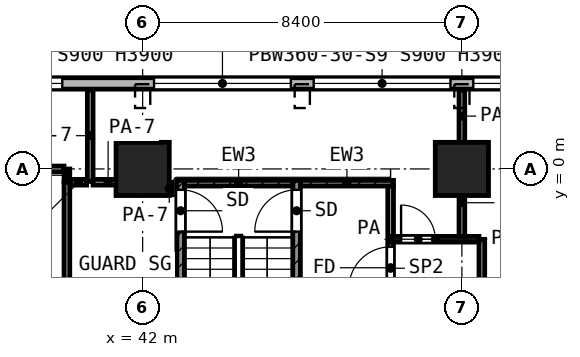
"""IFC4 building model, lengths in metres.
Left out: names, types, materials, properties, quantities, classifications, styles, units other than length and angle.
Written with IfcOpenShell. Run it as: python <this file> out.ifc"""

import sys

from ifc_helpers import new_model, si_unit, direction, frame, frame_2d, origin, origin_2d, place, context, subcontext, project, spatial, rectangle, extrude, element, fill, save


model = new_model("IFC4")
c1 = context("Model", 3, precision=1e-05, world=origin(), true_north=direction((0.0, 1.0)))
c2 = subcontext(c1, "Body", "Model", "MODEL_VIEW")
j1 = project(units=[si_unit("LENGTHUNIT", "METRE"), si_unit("PLANEANGLEUNIT", "RADIAN")], contexts=[c1])
p1 = place(None, origin())
s1 = spatial("IfcSite", under=j1, at=p1, CompositionType="ELEMENT")
p2 = place(p1, origin())
s2 = spatial("IfcBuilding", under=s1, at=p2, CompositionType="ELEMENT")
p3 = place(p2, frame((0.0, 0.0, 18.2)))
s3 = spatial("IfcBuildingStorey", under=s2, at=p3, CompositionType="ELEMENT", Elevation=18.2)
for number, where, z_axis, x_axis in (
    (1, (42.0, 0.0, 0.0), (0.0, 0.0, 1.0), (1.0, 0.0, 0.0)),
    (2, (50.4, 0.0, 0.0), (0.0, 0.0, 1.0), (1.0, 0.0, 0.0)),
):
    element("IfcColumn", number, at=place(p3, frame(where, z_axis=z_axis, x_axis=x_axis)), inside=s3, PredefinedType="COLUMN", context=c2, shape_type="SweptSolid", body=[
        extrude(rectangle(XDim=1.4, YDim=1.4, at=origin_2d()), origin(), (0.0, 0.0, 1.0), 5.6),
    ])
p4 = place(p3, frame((59.85, 2.25, 0.0), z_axis=(0.0, 0.0, 1.0), x_axis=(-1.0, 0.0, 0.0)))
e3 = element("IfcWall", 3, at=p4, inside=s3, PredefinedType="SOLIDWALL", context=c2, shape_type="SweptSolid", body=[
    extrude(rectangle(XDim=56.188, YDim=0.3, at=frame_2d((28.094, 0.0))), origin(), (0.0, 0.0, 1.0), 5.05),
])
p5 = place(p4, frame((2.465, 0.0, 0.9)))
e4 = element("IfcOpeningElement", 4, at=p5, cuts=e3, PredefinedType="OPENING", context=c2, shape_type="SweptSolid", body=[
    extrude(rectangle(XDim=2.4, YDim=3.0, at=frame_2d((1.2, 1.5))), frame((0.0, 0.16, 0.0), z_axis=(0.0, -1.0, 0.0), x_axis=(1.0, 0.0, 0.0)), (0.0, 0.0, 1.0), 0.32),
])
p6 = place(p4, frame((5.55, 0.0, 0.9)))
e5 = element("IfcOpeningElement", 5, at=p6, cuts=e3, PredefinedType="OPENING", context=c2, shape_type="SweptSolid", body=[
    extrude(rectangle(XDim=3.6, YDim=3.0, at=frame_2d((1.8, 1.5))), frame((0.0, 0.16, 0.0), z_axis=(0.0, -1.0, 0.0), x_axis=(1.0, 0.0, 0.0)), (0.0, 0.0, 1.0), 0.32),
])
p7 = place(p4, frame((9.75, 0.0, 0.9)))
e6 = element("IfcOpeningElement", 6, at=p7, cuts=e3, PredefinedType="OPENING", context=c2, shape_type="SweptSolid", body=[
    extrude(rectangle(XDim=3.6, YDim=3.0, at=frame_2d((1.8, 1.5))), frame((0.0, 0.16, 0.0), z_axis=(0.0, -1.0, 0.0), x_axis=(1.0, 0.0, 0.0)), (0.0, 0.0, 1.0), 0.32),
])
p8 = place(p4, frame((13.95, 0.0, 0.9)))
e7 = element("IfcOpeningElement", 7, at=p8, cuts=e3, PredefinedType="OPENING", context=c2, shape_type="SweptSolid", body=[
    extrude(rectangle(XDim=3.6, YDim=3.0, at=frame_2d((1.8, 1.5))), frame((0.0, 0.16, 0.0), z_axis=(0.0, -1.0, 0.0), x_axis=(1.0, 0.0, 0.0)), (0.0, 0.0, 1.0), 0.32),
])
p9 = place(p4, frame((19.965, 0.0, 0.9)))
e8 = element("IfcOpeningElement", 8, at=p9, cuts=e3, PredefinedType="OPENING", context=c2, shape_type="SweptSolid", body=[
    extrude(rectangle(XDim=1.2, YDim=3.0, at=frame_2d((0.6, 1.5))), frame((0.0, 0.16, 0.0), z_axis=(0.0, -1.0, 0.0), x_axis=(1.0, 0.0, 0.0)), (0.0, 0.0, 1.0), 0.32),
])
p10 = place(p4, frame((22.35, 0.0, 0.9)))
e9 = element("IfcOpeningElement", 9, at=p10, cuts=e3, PredefinedType="OPENING", context=c2, shape_type="SweptSolid", body=[
    extrude(rectangle(XDim=3.6, YDim=3.0, at=frame_2d((1.8, 1.5))), frame((0.0, 0.16, 0.0), z_axis=(0.0, -1.0, 0.0), x_axis=(1.0, 0.0, 0.0)), (0.0, 0.0, 1.0), 0.32),
])
p11 = place(p4, frame((26.55, 0.0, 0.9)))
e10 = element("IfcOpeningElement", 10, at=p11, cuts=e3, PredefinedType="OPENING", context=c2, shape_type="SweptSolid", body=[
    extrude(rectangle(XDim=3.6, YDim=3.0, at=frame_2d((1.8, 1.5))), frame((0.0, 0.16, 0.0), z_axis=(0.0, -1.0, 0.0), x_axis=(1.0, 0.0, 0.0)), (0.0, 0.0, 1.0), 0.32),
])
p12 = place(p4, frame((30.75, 0.0, 0.9)))
e11 = element("IfcOpeningElement", 11, at=p12, cuts=e3, PredefinedType="OPENING", context=c2, shape_type="SweptSolid", body=[
    extrude(rectangle(XDim=3.6, YDim=3.0, at=frame_2d((1.8, 1.5))), frame((0.0, 0.16, 0.0), z_axis=(0.0, -1.0, 0.0), x_axis=(1.0, 0.0, 0.0)), (0.0, 0.0, 1.0), 0.32),
])
p13 = place(p4, frame((34.95, 0.0, 0.9)))
e12 = element("IfcOpeningElement", 12, at=p13, cuts=e3, PredefinedType="OPENING", context=c2, shape_type="SweptSolid", body=[
    extrude(rectangle(XDim=3.6, YDim=3.0, at=frame_2d((1.8, 1.5))), frame((0.0, 0.16, 0.0), z_axis=(0.0, -1.0, 0.0), x_axis=(1.0, 0.0, 0.0)), (0.0, 0.0, 1.0), 0.32),
])
p14 = place(p4, frame((39.15, 0.0, 0.9)))
e13 = element("IfcOpeningElement", 13, at=p14, cuts=e3, PredefinedType="OPENING", context=c2, shape_type="SweptSolid", body=[
    extrude(rectangle(XDim=3.6, YDim=3.0, at=frame_2d((1.8, 1.5))), frame((0.0, 0.16, 0.0), z_axis=(0.0, -1.0, 0.0), x_axis=(1.0, 0.0, 0.0)), (0.0, 0.0, 1.0), 0.32),
])
p15 = place(p4, frame((43.35, 0.0, 0.9)))
e14 = element("IfcOpeningElement", 14, at=p15, cuts=e3, PredefinedType="OPENING", context=c2, shape_type="SweptSolid", body=[
    extrude(rectangle(XDim=3.6, YDim=3.0, at=frame_2d((1.8, 1.5))), frame((0.0, 0.16, 0.0), z_axis=(0.0, -1.0, 0.0), x_axis=(1.0, 0.0, 0.0)), (0.0, 0.0, 1.0), 0.32),
])
p16 = place(p4, frame((47.55, 0.0, 0.9)))
e15 = element("IfcOpeningElement", 15, at=p16, cuts=e3, PredefinedType="OPENING", context=c2, shape_type="SweptSolid", body=[
    extrude(rectangle(XDim=3.6, YDim=3.0, at=frame_2d((1.8, 1.5))), frame((0.0, 0.16, 0.0), z_axis=(0.0, -1.0, 0.0), x_axis=(1.0, 0.0, 0.0)), (0.0, 0.0, 1.0), 0.32),
])
p17 = place(p4, frame((51.75, 0.0, 0.9)))
e16 = element("IfcOpeningElement", 16, at=p17, cuts=e3, PredefinedType="OPENING", context=c2, shape_type="SweptSolid", body=[
    extrude(rectangle(XDim=3.6, YDim=3.0, at=frame_2d((1.8, 1.5))), frame((0.0, 0.16, 0.0), z_axis=(0.0, -1.0, 0.0), x_axis=(1.0, 0.0, 0.0)), (0.0, 0.0, 1.0), 0.32),
])
p18 = place(p3, frame((43.0, -8.65, 0.0), z_axis=(0.0, 0.0, 1.0), x_axis=(0.0, 1.0, 0.0)))
e17 = element("IfcWall", 17, at=p18, inside=s3, PredefinedType="SHEAR", context=c2, shape_type="SweptSolid", body=[
    extrude(rectangle(XDim=8.35, YDim=0.2, at=frame_2d((4.175, 0.0))), origin(), (0.0, 0.0, 1.0), 5.05),
])
p19 = place(p18, frame((7.0, 0.0, 0.0)))
e18 = element("IfcOpeningElement", 18, at=p19, cuts=e17, PredefinedType="OPENING", context=c2, shape_type="SweptSolid", body=[
    extrude(rectangle(XDim=1.1, YDim=2.1, at=frame_2d((0.55, 1.05))), frame((0.0, 0.11, 0.0), z_axis=(0.0, -1.0, 0.0), x_axis=(1.0, 0.0, 0.0)), (0.0, 0.0, 1.0), 0.22),
])
p20 = place(p3, frame((46.05, -8.65, 0.0), z_axis=(0.0, 0.0, 1.0), x_axis=(0.0, 1.0, 0.0)))
e19 = element("IfcWall", 19, at=p20, inside=s3, PredefinedType="SHEAR", context=c2, shape_type="SweptSolid", body=[
    extrude(rectangle(XDim=8.35, YDim=0.2, at=frame_2d((4.175, 0.0))), origin(), (0.0, 0.0, 1.0), 5.05),
])
p21 = place(p20, frame((7.0, 0.0, 0.0)))
e20 = element("IfcOpeningElement", 20, at=p21, cuts=e19, PredefinedType="OPENING", context=c2, shape_type="SweptSolid", body=[
    extrude(rectangle(XDim=1.1, YDim=2.1, at=frame_2d((0.55, 1.05))), frame((0.0, 0.11, 0.0), z_axis=(0.0, -1.0, 0.0), x_axis=(1.0, 0.0, 0.0)), (0.0, 0.0, 1.0), 0.22),
])
p22 = place(p3, frame((43.1, -0.375, 0.0), z_axis=(0.0, 0.0, 1.0), x_axis=(1.0, 0.0, 0.0)))
e21 = element("IfcWall", 21, at=p22, inside=s3, PredefinedType="SHEAR", context=c2, shape_type="SweptSolid", body=[
    extrude(rectangle(XDim=2.85, YDim=0.15, at=frame_2d((1.425, 0.0))), origin(), (0.0, 0.0, 1.0), 5.05),
])
p23 = place(p3, frame((46.15, -0.375, 0.0), z_axis=(0.0, 0.0, 1.0), x_axis=(1.0, 0.0, 0.0)))
e22 = element("IfcWall", 22, at=p23, inside=s3, PredefinedType="SHEAR", context=c2, shape_type="SweptSolid", body=[
    extrude(rectangle(XDim=2.45, YDim=0.15, at=frame_2d((1.225, 0.0))), origin(), (0.0, 0.0, 1.0), 5.05),
])
p24 = place(p3, frame((48.525, -4.775, 0.0), z_axis=(0.0, 0.0, 1.0), x_axis=(0.0, 1.0, 0.0)))
e23 = element("IfcWall", 23, at=p24, inside=s3, PredefinedType="PARTITIONING", context=c2, shape_type="SweptSolid", body=[
    extrude(rectangle(XDim=4.325, YDim=0.15, at=frame_2d((2.163, 0.0))), origin(), (0.0, 0.0, 1.0), 5.05),
])
p25 = place(p24, frame((1.625, 0.0, 0.0)))
e24 = element("IfcOpeningElement", 24, at=p25, cuts=e23, PredefinedType="OPENING", context=c2, shape_type="SweptSolid", body=[
    extrude(rectangle(XDim=1.1, YDim=2.1, at=frame_2d((0.55, 1.05))), frame((0.0, 0.085, 0.0), z_axis=(0.0, -1.0, 0.0), x_axis=(1.0, 0.0, 0.0)), (0.0, 0.0, 1.0), 0.17),
])
p26 = place(p3, frame((48.55, -1.85, 0.0), z_axis=(0.0, 0.0, 1.0), x_axis=(1.0, 0.0, 0.0)))
e25 = element("IfcWall", 25, at=p26, inside=s3, PredefinedType="PARTITIONING", context=c2, shape_type="SweptSolid", body=[
    extrude(rectangle(XDim=2.298, YDim=0.15, at=frame_2d((1.149, 0.0))), origin(), (0.0, 0.0, 1.0), 5.05),
])
p27 = place(p26, frame((0.25, 0.0, 0.0)))
e26 = element("IfcOpeningElement", 26, at=p27, cuts=e25, PredefinedType="OPENING", context=c2, shape_type="SweptSolid", body=[
    extrude(rectangle(XDim=0.9, YDim=2.1, at=frame_2d((0.45, 1.05))), frame((0.0, 0.085, 0.0), z_axis=(0.0, -1.0, 0.0), x_axis=(1.0, 0.0, 0.0)), (0.0, 0.0, 1.0), 0.17),
])
p28 = place(p3, frame((40.102, -0.35, 0.0), z_axis=(0.0, 0.0, 1.0), x_axis=(1.0, 0.0, 0.0)))
e27 = element("IfcWall", 27, at=p28, inside=s3, PredefinedType="PARTITIONING", context=c2, shape_type="SweptSolid", body=[
    extrude(rectangle(XDim=0.423, YDim=0.15, at=frame_2d((0.211, 0.0))), origin(), (0.0, 0.0, 1.0), 3.65),
])
p29 = place(p3, frame((40.695, -0.35, 0.0), z_axis=(0.0, 0.0, 1.0), x_axis=(1.0, 0.0, 0.0)))
e28 = element("IfcWall", 28, at=p29, inside=s3, PredefinedType="PARTITIONING", context=c2, shape_type="SweptSolid", body=[
    extrude(rectangle(XDim=0.793, YDim=0.15, at=frame_2d((0.396, 0.0))), origin(), (0.0, 0.0, 1.0), 3.65),
])
p30 = place(p3, frame((38.478, 0.0, 0.0), z_axis=(0.0, 0.0, 1.0), x_axis=(1.0, 0.0, 0.0)))
e29 = element("IfcWall", 29, at=p30, inside=s3, PredefinedType="PARTITIONING", context=c2, shape_type="SweptSolid", body=[
    extrude(rectangle(XDim=1.452, YDim=0.15, at=frame_2d((0.726, 0.0))), origin(), (0.0, 0.0, 1.0), 3.65),
])
p31 = place(p3, frame((40.007, -8.4, 0.0), z_axis=(0.0, 0.0, 1.0), x_axis=(0.0, 1.0, 0.0)))
e30 = element("IfcWall", 30, at=p31, inside=s3, PredefinedType="PARTITIONING", context=c2, shape_type="SweptSolid", body=[
    extrude(rectangle(XDim=8.05, YDim=0.15, at=frame_2d((4.025, 0.0))), origin(), (0.0, 0.0, 1.0), 3.65),
])
p32 = place(p31, frame((3.525, 0.0, 0.0)))
e31 = element("IfcOpeningElement", 31, at=p32, cuts=e30, PredefinedType="OPENING", context=c2, shape_type="SweptSolid", body=[
    extrude(rectangle(XDim=1.0, YDim=2.1, at=frame_2d((0.5, 1.05))), frame((0.0, 0.085, 0.0), z_axis=(0.0, -1.0, 0.0), x_axis=(1.0, 0.0, 0.0)), (0.0, 0.0, 1.0), 0.17),
])
p33 = place(p3, frame((40.007, -0.33, 0.0), z_axis=(0.0, 0.0, 1.0), x_axis=(0.0, 1.0, 0.0)))
e32 = element("IfcWall", 32, at=p33, inside=s3, PredefinedType="PARTITIONING", context=c2, shape_type="SweptSolid", body=[
    extrude(rectangle(XDim=0.328, YDim=0.15, at=frame_2d((0.164, 0.0))), origin(), (0.0, 0.0, 1.0), 3.65),
])
p34 = place(p3, frame((40.62, -0.33, 0.0), z_axis=(0.0, 0.0, 1.0), x_axis=(0.0, 1.0, 0.0)))
e33 = element("IfcWall", 33, at=p34, inside=s3, PredefinedType="PARTITIONING", context=c2, shape_type="SweptSolid", body=[
    extrude(rectangle(XDim=2.41, YDim=0.15, at=frame_2d((1.205, 0.0))), origin(), (0.0, 0.0, 1.0), 3.65),
])
p35 = place(p3, frame((42.7, -0.68, 0.0), z_axis=(0.0, 0.0, 1.0), x_axis=(0.0, 1.0, 0.0)))
e34 = element("IfcWall", 34, at=p35, inside=s3, PredefinedType="PARTITIONING", context=c2, shape_type="SweptSolid", body=[
    extrude(rectangle(XDim=0.327, YDim=0.15, at=frame_2d((0.164, 0.0))), origin(), (0.0, 0.0, 1.0), 3.65),
])
p36 = place(p3, frame((50.4, -1.775, 0.0), z_axis=(0.0, 0.0, 1.0), x_axis=(0.0, 1.0, 0.0)))
e35 = element("IfcWall", 35, at=p36, inside=s3, PredefinedType="PARTITIONING", context=c2, shape_type="SweptSolid", body=[
    extrude(rectangle(XDim=1.772, YDim=0.15, at=frame_2d((0.886, 0.0))), origin(), (0.0, 0.0, 1.0), 5.05),
])
p37 = place(p3, frame((50.4, 0.7, 0.0), z_axis=(0.0, 0.0, 1.0), x_axis=(0.0, 1.0, 0.0)))
e36 = element("IfcWall", 36, at=p37, inside=s3, PredefinedType="PARTITIONING", context=c2, shape_type="SweptSolid", body=[
    extrude(rectangle(XDim=1.38, YDim=0.15, at=frame_2d((0.69, 0.0))), origin(), (0.0, 0.0, 1.0), 4.15),
])
p38 = place(p3, frame((50.925, -8.4, 0.0), z_axis=(0.0, 0.0, 1.0), x_axis=(0.0, 1.0, 0.0)))
e37 = element("IfcWall", 37, at=p38, inside=s3, PredefinedType="PARTITIONING", context=c2, shape_type="SweptSolid", body=[
    extrude(rectangle(XDim=6.548, YDim=0.15, at=frame_2d((3.274, 0.0))), origin(), (0.0, 0.0, 1.0), 5.05),
])
p39 = place(p38, frame((3.765, 0.0, 0.0)))
e38 = element("IfcOpeningElement", 38, at=p39, cuts=e37, PredefinedType="OPENING", context=c2, shape_type="SweptSolid", body=[
    extrude(rectangle(XDim=1.2, YDim=2.1, at=frame_2d((0.6, 1.05))), frame((0.0, 0.085, 0.0), z_axis=(0.0, -1.0, 0.0), x_axis=(1.0, 0.0, 0.0)), (0.0, 0.0, 1.0), 0.17),
])
p40 = place(p38, frame((1.583, 0.0, 0.0)))
e39 = element("IfcOpeningElement", 39, at=p40, cuts=e37, PredefinedType="OPENING", context=c2, shape_type="SweptSolid", body=[
    extrude(rectangle(XDim=1.2, YDim=2.1, at=frame_2d((0.6, 1.05))), frame((0.0, 0.085, 0.0), z_axis=(0.0, -1.0, 0.0), x_axis=(1.0, 0.0, 0.0)), (0.0, 0.0, 1.0), 0.17),
])
p41 = place(p6, origin())
e40 = element("IfcWindow", 40, at=p41, inside=s3, PartitioningType="SINGLE_PANEL", PredefinedType="WINDOW", context=c2, shape_type="SweptSolid", body=[
    extrude(rectangle(XDim=3.6, YDim=3.0, at=frame_2d((1.8, 1.5))), frame((0.0, 0.03, 0.0), z_axis=(0.0, -1.0, 0.0), x_axis=(1.0, 0.0, 0.0)), (0.0, 0.0, 1.0), 0.06),
])
fill(e5, e40)
p42 = place(p7, origin())
e41 = element("IfcWindow", 41, at=p42, inside=s3, PartitioningType="SINGLE_PANEL", PredefinedType="WINDOW", context=c2, shape_type="SweptSolid", body=[
    extrude(rectangle(XDim=3.6, YDim=3.0, at=frame_2d((1.8, 1.5))), frame((0.0, 0.03, 0.0), z_axis=(0.0, -1.0, 0.0), x_axis=(1.0, 0.0, 0.0)), (0.0, 0.0, 1.0), 0.06),
])
fill(e6, e41)
p43 = place(p8, origin())
e42 = element("IfcWindow", 42, at=p43, inside=s3, PartitioningType="SINGLE_PANEL", PredefinedType="WINDOW", context=c2, shape_type="SweptSolid", body=[
    extrude(rectangle(XDim=3.6, YDim=3.0, at=frame_2d((1.8, 1.5))), frame((0.0, 0.03, 0.0), z_axis=(0.0, -1.0, 0.0), x_axis=(1.0, 0.0, 0.0)), (0.0, 0.0, 1.0), 0.06),
])
fill(e7, e42)
p44 = place(p9, origin())
e43 = element("IfcWindow", 43, at=p44, inside=s3, PartitioningType="SINGLE_PANEL", PredefinedType="WINDOW", context=c2, shape_type="SweptSolid", body=[
    extrude(rectangle(XDim=1.2, YDim=3.0, at=frame_2d((0.6, 1.5))), frame((0.0, 0.03, 0.0), z_axis=(0.0, -1.0, 0.0), x_axis=(1.0, 0.0, 0.0)), (0.0, 0.0, 1.0), 0.06),
])
fill(e8, e43)
p45 = place(p19, frame((1.1, 0.0, 0.0), z_axis=(0.0, 0.0, 1.0), x_axis=(-1.0, 0.0, 0.0)))
e44 = element("IfcDoor", 44, at=p45, inside=s3, OperationType="SINGLE_SWING_LEFT", PredefinedType="DOOR", context=c2, shape_type="SweptSolid", body=[
    extrude(rectangle(XDim=1.1, YDim=2.1, at=frame_2d((0.55, 1.05))), frame((0.0, 0.025, 0.0), z_axis=(0.0, -1.0, 0.0), x_axis=(1.0, 0.0, 0.0)), (0.0, 0.0, 1.0), 0.05),
])
fill(e18, e44)
p46 = place(p21, origin())
e45 = element("IfcDoor", 45, at=p46, inside=s3, OperationType="SINGLE_SWING_LEFT", PredefinedType="DOOR", context=c2, shape_type="SweptSolid", body=[
    extrude(rectangle(XDim=1.1, YDim=2.1, at=frame_2d((0.55, 1.05))), frame((0.0, 0.025, 0.0), z_axis=(0.0, -1.0, 0.0), x_axis=(1.0, 0.0, 0.0)), (0.0, 0.0, 1.0), 0.05),
])
fill(e20, e45)
p47 = place(p25, origin())
e46 = element("IfcDoor", 46, at=p47, inside=s3, OperationType="SINGLE_SWING_LEFT", PredefinedType="DOOR", context=c2, shape_type="SweptSolid", body=[
    extrude(rectangle(XDim=1.1, YDim=2.1, at=frame_2d((0.55, 1.05))), frame((0.0, 0.025, 0.0), z_axis=(0.0, -1.0, 0.0), x_axis=(1.0, 0.0, 0.0)), (0.0, 0.0, 1.0), 0.05),
])
fill(e24, e46)
p48 = place(p27, origin())
e47 = element("IfcDoor", 47, at=p48, inside=s3, OperationType="SINGLE_SWING_LEFT", PredefinedType="DOOR", context=c2, shape_type="SweptSolid", body=[
    extrude(rectangle(XDim=0.9, YDim=2.1, at=frame_2d((0.45, 1.05))), frame((0.0, 0.025, 0.0), z_axis=(0.0, -1.0, 0.0), x_axis=(1.0, 0.0, 0.0)), (0.0, 0.0, 1.0), 0.05),
])
fill(e26, e47)
save(model, sys.argv[1])
